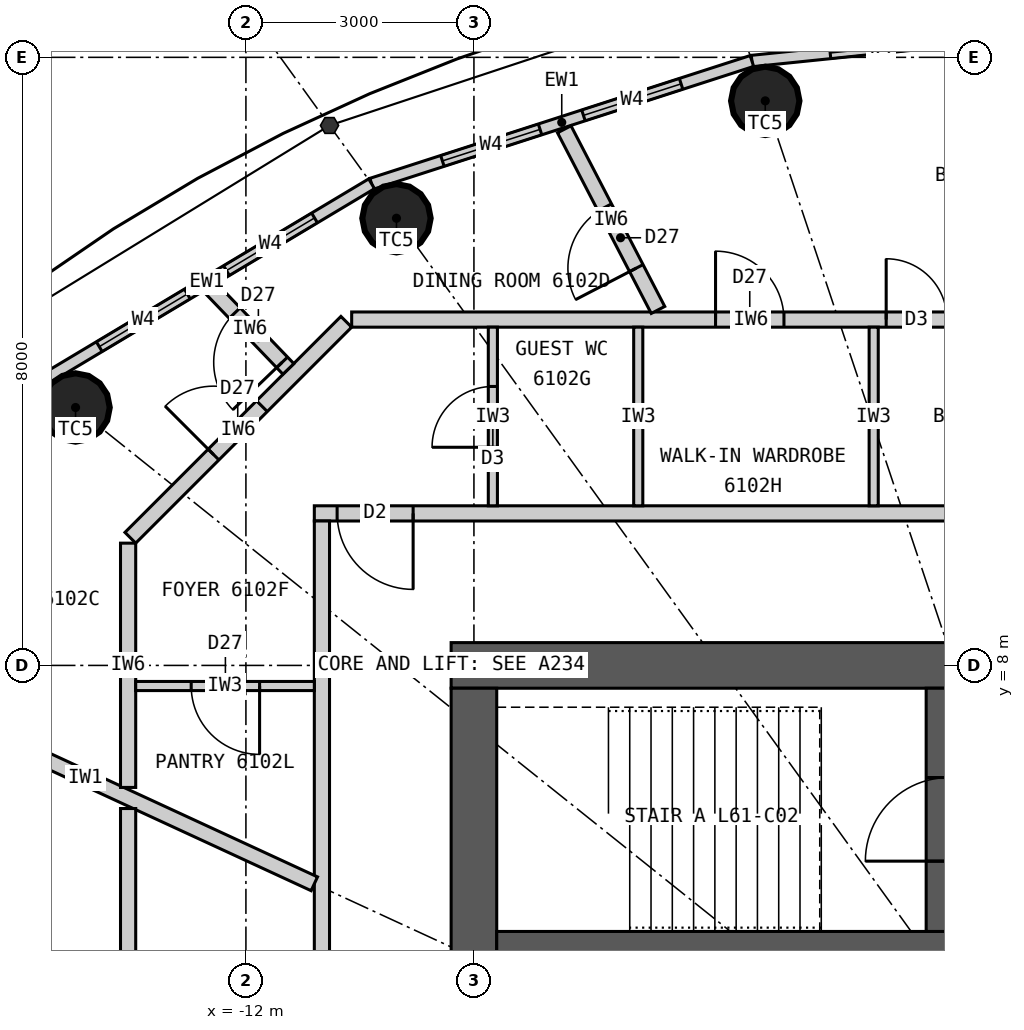
"""IFC4 building model, lengths in metres.
Left out: names, types, materials, properties, quantities, classifications, styles, units other than length and angle.
Written with IfcOpenShell. Run it as: python <this file> out.ifc"""

import sys

from ifc_helpers import new_model, si_unit, direction, frame, frame_2d, origin, origin_2d, place, context, subcontext, project, spatial, rectangle, circle, extrude, element, fill, save


model = new_model("IFC4")
c1 = context("Model", 3, precision=1e-05, world=origin(), true_north=direction((0.0, 1.0)))
c2 = subcontext(c1, "Body", "Model", "MODEL_VIEW")
j1 = project(units=[si_unit("LENGTHUNIT", "METRE"), si_unit("PLANEANGLEUNIT", "RADIAN")], contexts=[c1])
p1 = place(None, origin())
s1 = spatial("IfcSite", under=j1, at=p1, CompositionType="ELEMENT")
p2 = place(p1, origin())
s2 = spatial("IfcBuilding", under=s1, at=p2, CompositionType="ELEMENT")
p3 = place(p2, frame((0.0, 0.0, 225.9)))
s3 = spatial("IfcBuildingStorey", under=s2, at=p3, CompositionType="ELEMENT", Elevation=225.9)
for number, where, z_axis, x_axis in (
    (1, (-5.167, 15.427, 0.0), (0.0, 0.0, 1.0), (1.0, 0.0, 0.0)),
    (2, (-10.019, 13.883, 0.0), (0.0, 0.0, 1.0), (1.0, 0.0, 0.0)),
    (3, (-14.241, 11.393, 0.0), (0.0, 0.0, 1.0), (1.0, 0.0, 0.0)),
):
    element("IfcColumn", number, at=place(p3, frame(where, z_axis=z_axis, x_axis=x_axis)), inside=s3, PredefinedType="COLUMN", context=c2, shape_type="SweptSolid", body=[
        extrude(circle(Radius=0.45, at=origin_2d()), origin(), (0.0, 0.0, 1.0), 3.3),
    ])
p4 = place(p3, frame((-9.3, 8.0, 0.0), z_axis=(0.0, 0.0, 1.0), x_axis=(1.0, 0.0, 0.0)))
e4 = element("IfcWall", 4, at=p4, inside=s3, PredefinedType="SHEAR", context=c2, shape_type="SweptSolid", body=[
    extrude(rectangle(XDim=18.6, YDim=0.6, at=frame_2d((9.3, 0.0))), origin(), (0.0, 0.0, 1.0), 3.3),
])
p5 = place(p4, frame((8.0, 0.0, 0.0)))
e5 = element("IfcOpeningElement", 5, at=p5, cuts=e4, PredefinedType="OPENING", context=c2, shape_type="SweptSolid", body=[
    extrude(rectangle(XDim=1.2, YDim=2.2, at=frame_2d((0.6, 1.1))), frame((0.0, 0.31, 0.0), z_axis=(0.0, -1.0, 0.0), x_axis=(1.0, 0.0, 0.0)), (0.0, 0.0, 1.0), 0.62),
])
p6 = place(p4, frame((15.6, 0.0, 0.0)))
e6 = element("IfcOpeningElement", 6, at=p6, cuts=e4, PredefinedType="OPENING", context=c2, shape_type="SweptSolid", body=[
    extrude(rectangle(XDim=0.9, YDim=2.2, at=frame_2d((0.45, 1.1))), frame((0.0, 0.31, 0.0), z_axis=(0.0, -1.0, 0.0), x_axis=(1.0, 0.0, 0.0)), (0.0, 0.0, 1.0), 0.62),
])
p7 = place(p3, frame((-9.0, 7.7, 0.0), z_axis=(0.0, 0.0, 1.0), x_axis=(0.0, -1.0, 0.0)))
e7 = element("IfcWall", 7, at=p7, inside=s3, PredefinedType="SHEAR", context=c2, shape_type="SweptSolid", body=[
    extrude(rectangle(XDim=15.4, YDim=0.6, at=frame_2d((7.7, 0.0))), origin(), (0.0, 0.0, 1.0), 3.3),
])
p8 = place(p7, frame((6.8, 0.0, 0.0)))
e8 = element("IfcOpeningElement", 8, at=p8, cuts=e7, PredefinedType="OPENING", context=c2, shape_type="SweptSolid", body=[
    extrude(rectangle(XDim=1.8, YDim=2.2, at=frame_2d((0.9, 1.1))), frame((0.0, 0.31, 0.0), z_axis=(0.0, -1.0, 0.0), x_axis=(1.0, 0.0, 0.0)), (0.0, 0.0, 1.0), 0.62),
])
p9 = place(p3, frame((-8.7, 4.3, 0.0), z_axis=(0.0, 0.0, 1.0), x_axis=(1.0, 0.0, 0.0)))
e9 = element("IfcWall", 9, at=p9, inside=s3, PredefinedType="SHEAR", context=c2, shape_type="SweptSolid", body=[
    extrude(rectangle(XDim=17.4, YDim=0.4, at=frame_2d((8.7, 0.0))), origin(), (0.0, 0.0, 1.0), 3.3),
])
p10 = place(p3, frame((-2.75, 4.5, 0.0), z_axis=(0.0, 0.0, 1.0), x_axis=(0.0, 1.0, 0.0)))
e10 = element("IfcWall", 10, at=p10, inside=s3, PredefinedType="SHEAR", context=c2, shape_type="SweptSolid", body=[
    extrude(rectangle(XDim=3.2, YDim=0.6, at=frame_2d((1.6, 0.0))), origin(), (0.0, 0.0, 1.0), 3.3),
])
p11 = place(p10, frame((0.925, 0.0, 0.0)))
e11 = element("IfcOpeningElement", 11, at=p11, cuts=e10, PredefinedType="OPENING", context=c2, shape_type="SweptSolid", body=[
    extrude(rectangle(XDim=1.1, YDim=2.2, at=frame_2d((0.55, 1.1))), frame((0.0, 0.31, 0.0), z_axis=(0.0, -1.0, 0.0), x_axis=(1.0, 0.0, 0.0)), (0.0, 0.0, 1.0), 0.62),
])
p12 = place(p3, frame((0.0, 16.5, 0.0), z_axis=(0.0, 0.0, 1.0), x_axis=(-0.994774574972, -0.102095763818, 0.0)))
e12 = element("IfcWall", 12, at=p12, inside=s3, PredefinedType="ELEMENTEDWALL", context=c2, shape_type="SweptSolid", body=[
    extrude(rectangle(XDim=5.371, YDim=0.15, at=frame_2d((2.686, 0.0))), origin(), (0.0, 0.0, 1.0), 3.12),
])
p13 = place(p12, frame((1.035, 0.0, 0.9)))
e13 = element("IfcOpeningElement", 13, at=p13, cuts=e12, PredefinedType="OPENING", context=c2, shape_type="SweptSolid", body=[
    extrude(rectangle(XDim=1.35, YDim=1.9, at=frame_2d((0.675, 0.95))), frame((0.0, 0.085, 0.0), z_axis=(0.0, -1.0, 0.0), x_axis=(1.0, 0.0, 0.0)), (0.0, 0.0, 1.0), 0.17),
])
p14 = place(p12, frame((2.985, 0.0, 0.9)))
e14 = element("IfcOpeningElement", 14, at=p14, cuts=e12, PredefinedType="OPENING", context=c2, shape_type="SweptSolid", body=[
    extrude(rectangle(XDim=1.35, YDim=1.9, at=frame_2d((0.675, 0.95))), frame((0.0, 0.085, 0.0), z_axis=(0.0, -1.0, 0.0), x_axis=(1.0, 0.0, 0.0)), (0.0, 0.0, 1.0), 0.17),
])
p15 = place(p3, frame((-5.343, 15.952, 0.0), z_axis=(0.0, 0.0, 1.0), x_axis=(-0.951644702515, -0.307200846638, 0.0)))
e15 = element("IfcWall", 15, at=p15, inside=s3, PredefinedType="ELEMENTEDWALL", context=c2, shape_type="SweptSolid", body=[
    extrude(rectangle(XDim=5.258, YDim=0.15, at=frame_2d((2.629, 0.0))), origin(), (0.0, 0.0, 1.0), 3.12),
])
p16 = place(p15, frame((0.979, 0.0, 0.9)))
e16 = element("IfcOpeningElement", 16, at=p16, cuts=e15, PredefinedType="OPENING", context=c2, shape_type="SweptSolid", body=[
    extrude(rectangle(XDim=1.35, YDim=1.9, at=frame_2d((0.675, 0.95))), frame((0.0, 0.085, 0.0), z_axis=(0.0, -1.0, 0.0), x_axis=(1.0, 0.0, 0.0)), (0.0, 0.0, 1.0), 0.17),
])
p17 = place(p15, frame((2.929, 0.0, 0.9)))
e17 = element("IfcOpeningElement", 17, at=p17, cuts=e15, PredefinedType="OPENING", context=c2, shape_type="SweptSolid", body=[
    extrude(rectangle(XDim=1.35, YDim=1.9, at=frame_2d((0.675, 0.95))), frame((0.0, 0.085, 0.0), z_axis=(0.0, -1.0, 0.0), x_axis=(1.0, 0.0, 0.0)), (0.0, 0.0, 1.0), 0.17),
])
p18 = place(p3, frame((-10.346, 14.336, 0.0), z_axis=(0.0, 0.0, 1.0), x_axis=(-0.85822150553, -0.513279502265, 0.0)))
e18 = element("IfcWall", 18, at=p18, inside=s3, PredefinedType="ELEMENTEDWALL", context=c2, shape_type="SweptSolid", body=[
    extrude(rectangle(XDim=5.05, YDim=0.15, at=frame_2d((2.525, 0.0))), origin(), (0.0, 0.0, 1.0), 3.12),
])
p19 = place(p18, frame((0.875, 0.0, 0.9)))
e19 = element("IfcOpeningElement", 19, at=p19, cuts=e18, PredefinedType="OPENING", context=c2, shape_type="SweptSolid", body=[
    extrude(rectangle(XDim=1.35, YDim=1.9, at=frame_2d((0.675, 0.95))), frame((0.0, 0.085, 0.0), z_axis=(0.0, -1.0, 0.0), x_axis=(1.0, 0.0, 0.0)), (0.0, 0.0, 1.0), 0.17),
])
p20 = place(p18, frame((2.825, 0.0, 0.9)))
e20 = element("IfcOpeningElement", 20, at=p20, cuts=e18, PredefinedType="OPENING", context=c2, shape_type="SweptSolid", body=[
    extrude(rectangle(XDim=1.35, YDim=1.9, at=frame_2d((0.675, 0.95))), frame((0.0, 0.085, 0.0), z_axis=(0.0, -1.0, 0.0), x_axis=(1.0, 0.0, 0.0)), (0.0, 0.0, 1.0), 0.17),
])
p21 = place(p3, frame((-11.1, 10.0, 0.0), z_axis=(0.0, 0.0, 1.0), x_axis=(1.0, 0.0, 0.0)))
e21 = element("IfcWall", 21, at=p21, inside=s3, PredefinedType="PARTITIONING", context=c2, shape_type="SweptSolid", body=[
    extrude(rectangle(XDim=22.2, YDim=0.2, at=frame_2d((11.1, 0.0))), origin(), (0.0, 0.0, 1.0), 3.12),
])
p22 = place(p21, frame((0.3, 0.0, 0.0)))
e22 = element("IfcOpeningElement", 22, at=p22, cuts=e21, PredefinedType="OPENING", context=c2, shape_type="SweptSolid", body=[
    extrude(rectangle(XDim=1.0, YDim=2.2, at=frame_2d((0.5, 1.1))), frame((0.0, 0.11, 0.0), z_axis=(0.0, -1.0, 0.0), x_axis=(1.0, 0.0, 0.0)), (0.0, 0.0, 1.0), 0.22),
])
p23 = place(p3, frame((-11.0, 9.9, 0.0), z_axis=(0.0, 0.0, 1.0), x_axis=(0.0, -1.0, 0.0)))
e23 = element("IfcWall", 23, at=p23, inside=s3, PredefinedType="PARTITIONING", context=c2, shape_type="SweptSolid", body=[
    extrude(rectangle(XDim=19.8, YDim=0.2, at=frame_2d((9.9, 0.0))), origin(), (0.0, 0.0, 1.0), 3.12),
])
p24 = place(p23, frame((9.385, 0.0, 0.0)))
e24 = element("IfcOpeningElement", 24, at=p24, cuts=e23, PredefinedType="OPENING", context=c2, shape_type="SweptSolid", body=[
    extrude(rectangle(XDim=1.0, YDim=2.2, at=frame_2d((0.5, 1.1))), frame((0.0, 0.11, 0.0), z_axis=(0.0, -1.0, 0.0), x_axis=(1.0, 0.0, 0.0)), (0.0, 0.0, 1.0), 0.22),
])
p25 = place(p23, frame((18.658, 0.0, 0.0)))
e25 = element("IfcOpeningElement", 25, at=p25, cuts=e23, PredefinedType="OPENING", context=c2, shape_type="SweptSolid", body=[
    extrude(rectangle(XDim=1.0, YDim=2.2, at=frame_2d((0.5, 1.1))), frame((0.0, 0.11, 0.0), z_axis=(0.0, -1.0, 0.0), x_axis=(1.0, 0.0, 0.0)), (0.0, 0.0, 1.0), 0.22),
])
p26 = place(p3, frame((-11.1, 5.127, 0.0), z_axis=(0.0, 0.0, 1.0), x_axis=(-0.907840886552, 0.419314827672, 0.0)))
e26 = element("IfcWall", 26, at=p26, inside=s3, PredefinedType="PARTITIONING", context=c2, shape_type="SweptSolid", body=[
    extrude(rectangle(XDim=6.635, YDim=0.2, at=frame_2d((3.318, 0.0))), origin(), (0.0, 0.0, 1.0), 2.32),
])
p27 = place(p3, frame((-0.101, 12.55, 0.0), z_axis=(0.0, 0.0, 1.0), x_axis=(-1.0, 0.0, 0.0)))
e27 = element("IfcWall", 27, at=p27, inside=s3, PredefinedType="PARTITIONING", context=c2, shape_type="SweptSolid", body=[
    extrude(rectangle(XDim=10.508, YDim=0.2, at=frame_2d((5.254, 0.0))), origin(), (0.0, 0.0, 1.0), 3.12),
])
p28 = place(p27, frame((2.675, 0.0, 0.0)))
e28 = element("IfcOpeningElement", 28, at=p28, cuts=e27, PredefinedType="OPENING", context=c2, shape_type="SweptSolid", body=[
    extrude(rectangle(XDim=0.8, YDim=2.1, at=frame_2d((0.4, 1.05))), frame((0.0, 0.11, 0.0), z_axis=(0.0, -1.0, 0.0), x_axis=(1.0, 0.0, 0.0)), (0.0, 0.0, 1.0), 0.22),
])
p29 = place(p27, frame((4.82, 0.0, 0.0)))
e29 = element("IfcOpeningElement", 29, at=p29, cuts=e27, PredefinedType="OPENING", context=c2, shape_type="SweptSolid", body=[
    extrude(rectangle(XDim=0.9, YDim=2.1, at=frame_2d((0.45, 1.05))), frame((0.0, 0.11, 0.0), z_axis=(0.0, -1.0, 0.0), x_axis=(1.0, 0.0, 0.0)), (0.0, 0.0, 1.0), 0.22),
])
p30 = place(p3, frame((-10.679, 12.521, 0.0), z_axis=(0.0, 0.0, 1.0), x_axis=(-0.707106781187, -0.707106781187, 0.0)))
e30 = element("IfcWall", 30, at=p30, inside=s3, PredefinedType="PARTITIONING", context=c2, shape_type="SweptSolid", body=[
    extrude(rectangle(XDim=4.019, YDim=0.2, at=frame_2d((2.009, 0.0))), origin(), (0.0, 0.0, 1.0), 3.12),
])
p31 = place(p30, frame((1.57, 0.0, 0.0)))
e31 = element("IfcOpeningElement", 31, at=p31, cuts=e30, PredefinedType="OPENING", context=c2, shape_type="SweptSolid", body=[
    extrude(rectangle(XDim=0.9, YDim=2.1, at=frame_2d((0.45, 1.05))), frame((0.0, 0.11, 0.0), z_axis=(0.0, -1.0, 0.0), x_axis=(1.0, 0.0, 0.0)), (0.0, 0.0, 1.0), 0.22),
])
p32 = place(p3, frame((-13.55, 9.609, 0.0), z_axis=(0.0, 0.0, 1.0), x_axis=(0.0, -1.0, 0.0)))
e32 = element("IfcWall", 32, at=p32, inside=s3, PredefinedType="PARTITIONING", context=c2, shape_type="SweptSolid", body=[
    extrude(rectangle(XDim=3.214, YDim=0.2, at=frame_2d((1.607, 0.0))), origin(), (0.0, 0.0, 1.0), 3.12),
])
p33 = place(p3, frame((-6.578, 12.677, 0.0), z_axis=(0.0, 0.0, 1.0), x_axis=(-0.460620531465, 0.887597164255, 0.0)))
e33 = element("IfcWall", 33, at=p33, inside=s3, PredefinedType="PARTITIONING", context=c2, shape_type="SweptSolid", body=[
    extrude(rectangle(XDim=2.678, YDim=0.2, at=frame_2d((1.339, 0.0))), origin(), (0.0, 0.0, 1.0), 3.12),
])
p34 = place(p33, frame((0.62, 0.0, 0.0)))
e34 = element("IfcOpeningElement", 34, at=p34, cuts=e33, PredefinedType="OPENING", context=c2, shape_type="SweptSolid", body=[
    extrude(rectangle(XDim=0.9, YDim=2.1, at=frame_2d((0.45, 1.05))), frame((0.0, 0.11, 0.0), z_axis=(0.0, -1.0, 0.0), x_axis=(1.0, 0.0, 0.0)), (0.0, 0.0, 1.0), 0.22),
])
p35 = place(p3, frame((-11.441, 11.9, 0.0), z_axis=(0.0, 0.0, 1.0), x_axis=(-0.692958717259, 0.720977264672, 0.0)))
e35 = element("IfcWall", 35, at=p35, inside=s3, PredefinedType="PARTITIONING", context=c2, shape_type="SweptSolid", body=[
    extrude(rectangle(XDim=1.464, YDim=0.2, at=frame_2d((0.732, 0.0))), origin(), (0.0, 0.0, 1.0), 3.12),
])
p36 = place(p35, frame((0.12, 0.0, 0.0)))
e36 = element("IfcOpeningElement", 36, at=p36, cuts=e35, PredefinedType="OPENING", context=c2, shape_type="SweptSolid", body=[
    extrude(rectangle(XDim=0.9, YDim=2.1, at=frame_2d((0.45, 1.05))), frame((0.0, 0.11, 0.0), z_axis=(0.0, -1.0, 0.0), x_axis=(1.0, 0.0, 0.0)), (0.0, 0.0, 1.0), 0.22),
])
for number, where, z_axis, x_axis in (
    (37, (-3.74, 10.1, 0.0), (0.0, 0.0, 1.0), (0.0, 1.0, 0.0)),
    (38, (-6.838, 10.1, 0.0), (0.0, 0.0, 1.0), (0.0, 1.0, 0.0)),
):
    element("IfcWall", number, at=place(p3, frame(where, z_axis=z_axis, x_axis=x_axis)), inside=s3, PredefinedType="PARTITIONING", context=c2, shape_type="SweptSolid", body=[
        extrude(rectangle(XDim=2.35, YDim=0.12, at=frame_2d((1.175, 0.0))), origin(), (0.0, 0.0, 1.0), 3.12),
    ])
p37 = place(p3, frame((-8.751, 10.1, 0.0), z_axis=(0.0, 0.0, 1.0), x_axis=(0.0, 1.0, 0.0)))
e39 = element("IfcWall", 39, at=p37, inside=s3, PredefinedType="PARTITIONING", context=c2, shape_type="SweptSolid", body=[
    extrude(rectangle(XDim=2.35, YDim=0.12, at=frame_2d((1.175, 0.0))), origin(), (0.0, 0.0, 1.0), 3.12),
])
p38 = place(p37, frame((0.77, 0.0, 0.0)))
e40 = element("IfcOpeningElement", 40, at=p38, cuts=e39, PredefinedType="OPENING", context=c2, shape_type="SweptSolid", body=[
    extrude(rectangle(XDim=0.8, YDim=2.1, at=frame_2d((0.4, 1.05))), frame((0.0, 0.07, 0.0), z_axis=(0.0, -1.0, 0.0), x_axis=(1.0, 0.0, 0.0)), (0.0, 0.0, 1.0), 0.14),
])
p39 = place(p3, frame((-11.1, 7.729, 0.0), z_axis=(0.0, 0.0, 1.0), x_axis=(-1.0, 0.0, 0.0)))
e41 = element("IfcWall", 41, at=p39, inside=s3, PredefinedType="PARTITIONING", context=c2, shape_type="SweptSolid", body=[
    extrude(rectangle(XDim=2.35, YDim=0.12, at=frame_2d((1.175, 0.0))), origin(), (0.0, 0.0, 1.0), 3.12),
])
p40 = place(p39, frame((0.72, 0.0, 0.0)))
e42 = element("IfcOpeningElement", 42, at=p40, cuts=e41, PredefinedType="OPENING", context=c2, shape_type="SweptSolid", body=[
    extrude(rectangle(XDim=0.9, YDim=2.1, at=frame_2d((0.45, 1.05))), frame((0.0, 0.07, 0.0), z_axis=(0.0, -1.0, 0.0), x_axis=(1.0, 0.0, 0.0)), (0.0, 0.0, 1.0), 0.14),
])
p41 = place(p3, frame((-13.55, 6.117, 0.0), z_axis=(0.0, 0.0, 1.0), x_axis=(0.0, -1.0, 0.0)))
e43 = element("IfcWall", 43, at=p41, inside=s3, PredefinedType="PARTITIONING", context=c2, shape_type="SweptSolid", body=[
    extrude(rectangle(XDim=12.24, YDim=0.2, at=frame_2d((6.12, 0.0))), origin(), (0.0, 0.0, 1.0), 3.12),
])
p42 = place(p41, frame((2.07, 0.0, 0.0)))
e44 = element("IfcOpeningElement", 44, at=p42, cuts=e43, PredefinedType="OPENING", context=c2, shape_type="SweptSolid", body=[
    extrude(rectangle(XDim=0.8, YDim=2.1, at=frame_2d((0.4, 1.05))), frame((0.0, 0.11, 0.0), z_axis=(0.0, -1.0, 0.0), x_axis=(1.0, 0.0, 0.0)), (0.0, 0.0, 1.0), 0.22),
])
p43 = place(p41, frame((9.37, 0.0, 0.0)))
e45 = element("IfcOpeningElement", 45, at=p43, cuts=e43, PredefinedType="OPENING", context=c2, shape_type="SweptSolid", body=[
    extrude(rectangle(XDim=0.8, YDim=2.1, at=frame_2d((0.4, 1.05))), frame((0.0, 0.11, 0.0), z_axis=(0.0, -1.0, 0.0), x_axis=(1.0, 0.0, 0.0)), (0.0, 0.0, 1.0), 0.22),
])
p44 = place(p41, frame((5.67, 0.0, 0.0)))
e46 = element("IfcOpeningElement", 46, at=p44, cuts=e43, PredefinedType="OPENING", context=c2, shape_type="SweptSolid", body=[
    extrude(rectangle(XDim=0.9, YDim=2.1, at=frame_2d((0.45, 1.05))), frame((0.0, 0.11, 0.0), z_axis=(0.0, -1.0, 0.0), x_axis=(1.0, 0.0, 0.0)), (0.0, 0.0, 1.0), 0.22),
])
p45 = place(p14, origin())
e47 = element("IfcWindow", 47, at=p45, inside=s3, PartitioningType="SINGLE_PANEL", PredefinedType="WINDOW", context=c2, shape_type="SweptSolid", body=[
    extrude(rectangle(XDim=1.35, YDim=1.9, at=frame_2d((0.675, 0.95))), frame((0.0, 0.03, 0.0), z_axis=(0.0, -1.0, 0.0), x_axis=(1.0, 0.0, 0.0)), (0.0, 0.0, 1.0), 0.06),
])
fill(e14, e47)
p46 = place(p16, origin())
e48 = element("IfcWindow", 48, at=p46, inside=s3, PartitioningType="SINGLE_PANEL", PredefinedType="WINDOW", context=c2, shape_type="SweptSolid", body=[
    extrude(rectangle(XDim=1.35, YDim=1.9, at=frame_2d((0.675, 0.95))), frame((0.0, 0.03, 0.0), z_axis=(0.0, -1.0, 0.0), x_axis=(1.0, 0.0, 0.0)), (0.0, 0.0, 1.0), 0.06),
])
fill(e16, e48)
p47 = place(p17, origin())
e49 = element("IfcWindow", 49, at=p47, inside=s3, PartitioningType="SINGLE_PANEL", PredefinedType="WINDOW", context=c2, shape_type="SweptSolid", body=[
    extrude(rectangle(XDim=1.35, YDim=1.9, at=frame_2d((0.675, 0.95))), frame((0.0, 0.03, 0.0), z_axis=(0.0, -1.0, 0.0), x_axis=(1.0, 0.0, 0.0)), (0.0, 0.0, 1.0), 0.06),
])
fill(e17, e49)
p48 = place(p19, origin())
e50 = element("IfcWindow", 50, at=p48, inside=s3, PartitioningType="SINGLE_PANEL", PredefinedType="WINDOW", context=c2, shape_type="SweptSolid", body=[
    extrude(rectangle(XDim=1.35, YDim=1.9, at=frame_2d((0.675, 0.95))), frame((0.0, 0.03, 0.0), z_axis=(0.0, -1.0, 0.0), x_axis=(1.0, 0.0, 0.0)), (0.0, 0.0, 1.0), 0.06),
])
fill(e19, e50)
p49 = place(p20, origin())
e51 = element("IfcWindow", 51, at=p49, inside=s3, PartitioningType="SINGLE_PANEL", PredefinedType="WINDOW", context=c2, shape_type="SweptSolid", body=[
    extrude(rectangle(XDim=1.35, YDim=1.9, at=frame_2d((0.675, 0.95))), frame((0.0, 0.03, 0.0), z_axis=(0.0, -1.0, 0.0), x_axis=(1.0, 0.0, 0.0)), (0.0, 0.0, 1.0), 0.06),
])
fill(e20, e51)
p50 = place(p22, origin())
e52 = element("IfcDoor", 52, at=p50, inside=s3, OperationType="SINGLE_SWING_RIGHT", PredefinedType="DOOR", context=c2, shape_type="SweptSolid", body=[
    extrude(rectangle(XDim=1.0, YDim=2.2, at=frame_2d((0.5, 1.1))), frame((0.0, 0.025, 0.0), z_axis=(0.0, -1.0, 0.0), x_axis=(1.0, 0.0, 0.0)), (0.0, 0.0, 1.0), 0.05),
])
fill(e22, e52)
p51 = place(p28, origin())
e53 = element("IfcDoor", 53, at=p51, inside=s3, OperationType="SINGLE_SWING_RIGHT", PredefinedType="DOOR", context=c2, shape_type="SweptSolid", body=[
    extrude(rectangle(XDim=0.8, YDim=2.1, at=frame_2d((0.4, 1.05))), frame((0.0, 0.025, 0.0), z_axis=(0.0, -1.0, 0.0), x_axis=(1.0, 0.0, 0.0)), (0.0, 0.0, 1.0), 0.05),
])
fill(e28, e53)
p52 = place(p29, origin())
e54 = element("IfcDoor", 54, at=p52, inside=s3, OperationType="SINGLE_SWING_RIGHT", PredefinedType="DOOR", context=c2, shape_type="SweptSolid", body=[
    extrude(rectangle(XDim=0.9, YDim=2.1, at=frame_2d((0.45, 1.05))), frame((0.0, 0.025, 0.0), z_axis=(0.0, -1.0, 0.0), x_axis=(1.0, 0.0, 0.0)), (0.0, 0.0, 1.0), 0.05),
])
fill(e29, e54)
p53 = place(p38, origin())
e55 = element("IfcDoor", 55, at=p53, inside=s3, OperationType="SINGLE_SWING_LEFT", PredefinedType="DOOR", context=c2, shape_type="SweptSolid", body=[
    extrude(rectangle(XDim=0.8, YDim=2.1, at=frame_2d((0.4, 1.05))), frame((0.0, 0.025, 0.0), z_axis=(0.0, -1.0, 0.0), x_axis=(1.0, 0.0, 0.0)), (0.0, 0.0, 1.0), 0.05),
])
fill(e40, e55)
p54 = place(p40, origin())
e56 = element("IfcDoor", 56, at=p54, inside=s3, OperationType="SINGLE_SWING_LEFT", PredefinedType="DOOR", context=c2, shape_type="SweptSolid", body=[
    extrude(rectangle(XDim=0.9, YDim=2.1, at=frame_2d((0.45, 1.05))), frame((0.0, 0.025, 0.0), z_axis=(0.0, -1.0, 0.0), x_axis=(1.0, 0.0, 0.0)), (0.0, 0.0, 1.0), 0.05),
])
fill(e42, e56)
p55 = place(p31, origin())
e57 = element("IfcDoor", 57, at=p55, inside=s3, OperationType="SINGLE_SWING_RIGHT", PredefinedType="DOOR", context=c2, shape_type="SweptSolid", body=[
    extrude(rectangle(XDim=0.9, YDim=2.1, at=frame_2d((0.45, 1.05))), frame((0.0, 0.025, 0.0), z_axis=(0.0, -1.0, 0.0), x_axis=(1.0, 0.0, 0.0)), (0.0, 0.0, 1.0), 0.05),
])
fill(e31, e57)
p56 = place(p34, origin())
e58 = element("IfcDoor", 58, at=p56, inside=s3, OperationType="SINGLE_SWING_LEFT", PredefinedType="DOOR", context=c2, shape_type="SweptSolid", body=[
    extrude(rectangle(XDim=0.9, YDim=2.1, at=frame_2d((0.45, 1.05))), frame((0.0, 0.025, 0.0), z_axis=(0.0, -1.0, 0.0), x_axis=(1.0, 0.0, 0.0)), (0.0, 0.0, 1.0), 0.05),
])
fill(e34, e58)
p57 = place(p36, origin())
e59 = element("IfcDoor", 59, at=p57, inside=s3, OperationType="SINGLE_SWING_LEFT", PredefinedType="DOOR", context=c2, shape_type="SweptSolid", body=[
    extrude(rectangle(XDim=0.9, YDim=2.1, at=frame_2d((0.45, 1.05))), frame((0.0, 0.025, 0.0), z_axis=(0.0, -1.0, 0.0), x_axis=(1.0, 0.0, 0.0)), (0.0, 0.0, 1.0), 0.05),
])
fill(e36, e59)
save(model, sys.argv[1])
